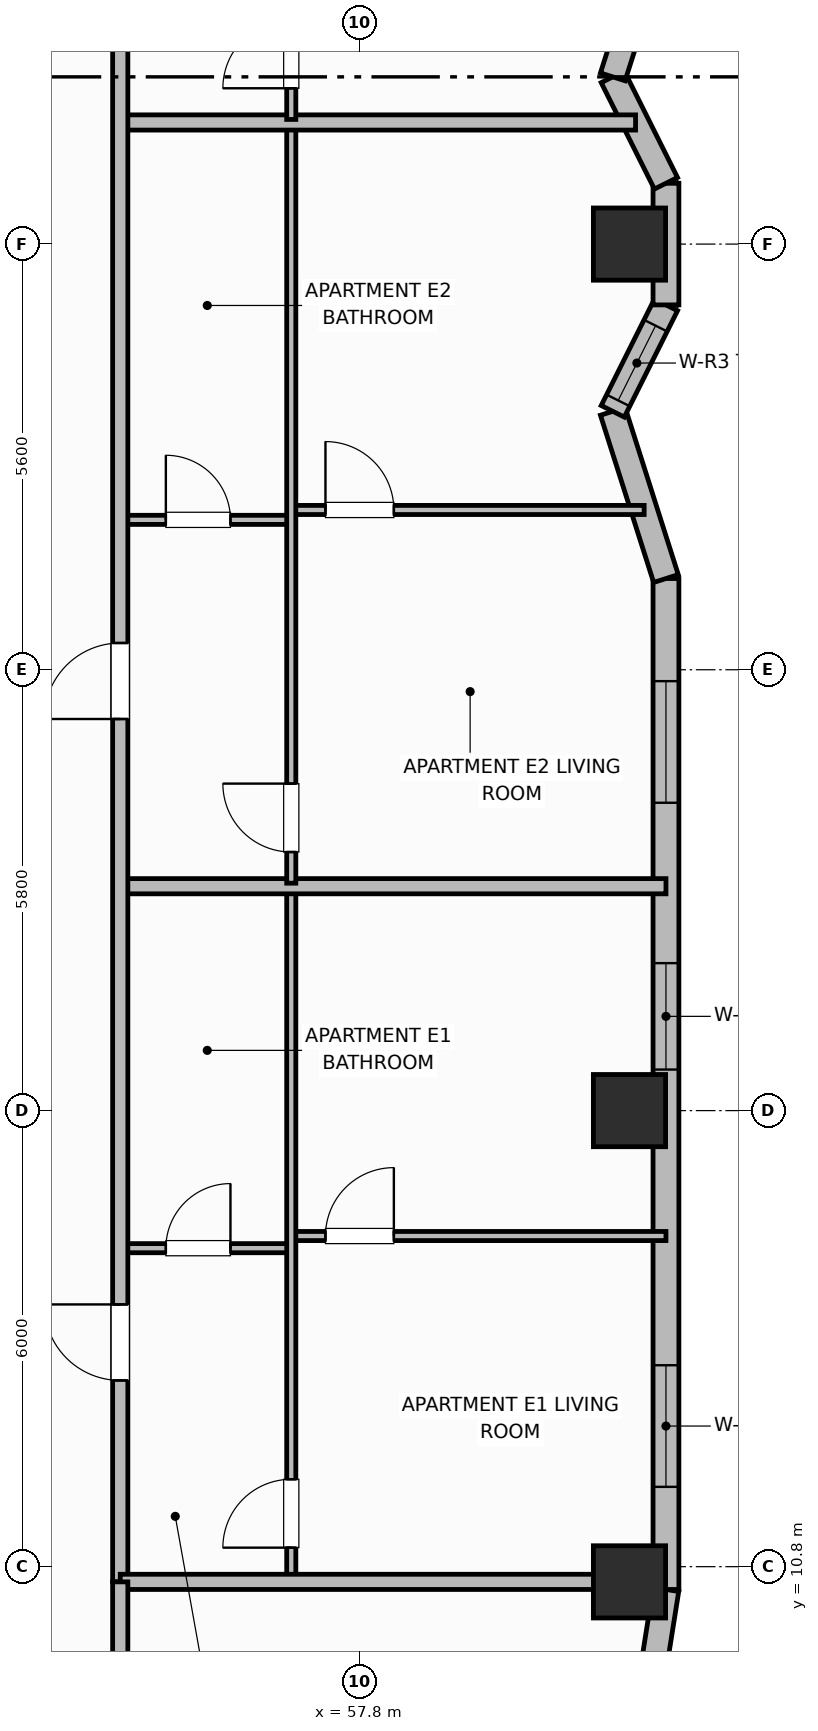
"""IFC4 building model, lengths in metres.
Left out: names, types, materials, properties, quantities, classifications, styles, units other than length and angle.
Written with IfcOpenShell. Run it as: python <this file> out.ifc"""

import sys

from ifc_helpers import new_model, si_unit, direction, frame, frame_2d, origin, origin_2d, place, context, subcontext, project, spatial, rectangle, extrude, element, fill, save


model = new_model("IFC4")
c1 = context("Model", 3, precision=1e-05, world=origin(), true_north=direction((0.0, 1.0)))
c2 = subcontext(c1, "Body", "Model", "MODEL_VIEW")
j1 = project(units=[si_unit("LENGTHUNIT", "METRE"), si_unit("PLANEANGLEUNIT", "RADIAN")], contexts=[c1])
p1 = place(None, origin())
s1 = spatial("IfcSite", under=j1, at=p1, CompositionType="ELEMENT")
p2 = place(p1, origin())
s2 = spatial("IfcBuilding", under=s1, at=p2, CompositionType="ELEMENT")
p3 = place(p2, frame((0.0, 0.0, 181.1)))
s3 = spatial("IfcBuildingStorey", under=s2, at=p3, CompositionType="ELEMENT", Elevation=181.1)
for number, where, z_axis, x_axis in (
    (1, (61.35, 10.6, 0.0), (0.0, 0.0, 1.0), (1.0, 0.0, 0.0)),
    (2, (61.35, 16.8, 0.0), (0.0, 0.0, 1.0), (1.0, 0.0, 0.0)),
    (3, (61.35, 28.2, 0.0), (0.0, 0.0, 1.0), (1.0, 0.0, 0.0)),
):
    element("IfcColumn", number, at=place(p3, frame(where, z_axis=z_axis, x_axis=x_axis)), inside=s3, PredefinedType="COLUMN", context=c2, shape_type="SweptSolid", body=[
        extrude(rectangle(XDim=0.95, YDim=0.95, at=origin_2d()), origin(), (0.0, 0.0, 1.0), 3.7),
    ])
p4 = place(p3, frame((61.652, 9.378, 0.0), z_axis=(0.0, 0.0, 1.0), x_axis=(0.156514556949, 0.987675651954, 0.0)))
e4 = element("IfcWall", 4, at=p4, inside=s3, PredefinedType="SOLIDWALL", context=c2, shape_type="SweptSolid", body=[
    extrude(rectangle(XDim=1.135, YDim=0.34, at=frame_2d((0.568, 0.0))), origin(), (0.0, 0.0, 1.0), 2.72),
])
p5 = place(p3, frame((61.83, 10.5, 0.0), z_axis=(0.0, 0.0, 1.0), x_axis=(0.0, 1.0, 0.0)))
e5 = element("IfcWall", 5, at=p5, inside=s3, PredefinedType="SOLIDWALL", context=c2, shape_type="SweptSolid", body=[
    extrude(rectangle(XDim=13.3, YDim=0.34, at=frame_2d((6.65, 0.0))), origin(), (0.0, 0.0, 1.0), 2.72),
])
p6 = place(p5, frame((1.35, 0.0, 0.7)))
e6 = element("IfcOpeningElement", 6, at=p6, cuts=e5, PredefinedType="OPENING", context=c2, shape_type="SweptSolid", body=[
    extrude(rectangle(XDim=1.6, YDim=1.9, at=frame_2d((0.8, 0.95))), frame((0.0, 0.18, 0.0), z_axis=(0.0, -1.0, 0.0), x_axis=(1.0, 0.0, 0.0)), (0.0, 0.0, 1.0), 0.36),
])
p7 = place(p5, frame((6.84, 0.0, 0.71)))
e7 = element("IfcOpeningElement", 7, at=p7, cuts=e5, PredefinedType="OPENING", context=c2, shape_type="SweptSolid", body=[
    extrude(rectangle(XDim=1.4, YDim=1.85, at=frame_2d((0.7, 0.925))), frame((0.0, 0.18, 0.0), z_axis=(0.0, -1.0, 0.0), x_axis=(1.0, 0.0, 0.0)), (0.0, 0.0, 1.0), 0.36),
])
p8 = place(p5, frame((10.35, 0.0, 0.7)))
e8 = element("IfcOpeningElement", 8, at=p8, cuts=e5, PredefinedType="OPENING", context=c2, shape_type="SweptSolid", body=[
    extrude(rectangle(XDim=1.6, YDim=1.9, at=frame_2d((0.8, 0.95))), frame((0.0, 0.18, 0.0), z_axis=(0.0, -1.0, 0.0), x_axis=(1.0, 0.0, 0.0)), (0.0, 0.0, 1.0), 0.36),
])
p9 = place(p3, frame((61.83, 23.8, 0.0), z_axis=(0.0, 0.0, 1.0), x_axis=(-0.303286588318, 0.95289938889, 0.0)))
e9 = element("IfcWall", 9, at=p9, inside=s3, PredefinedType="SOLIDWALL", context=c2, shape_type="SweptSolid", body=[
    extrude(rectangle(XDim=2.309, YDim=0.34, at=frame_2d((1.154, 0.0))), origin(), (0.0, 0.0, 1.0), 2.72),
])
p10 = place(p3, frame((61.13, 26.0, 0.0), z_axis=(0.0, 0.0, 1.0), x_axis=(0.447338371726, 0.894364792007, 0.0)))
e10 = element("IfcWall", 10, at=p10, inside=s3, PredefinedType="SOLIDWALL", context=c2, shape_type="SweptSolid", body=[
    extrude(rectangle(XDim=1.565, YDim=0.34, at=frame_2d((0.783, 0.0))), origin(), (0.0, 0.0, 1.0), 2.72),
])
p11 = place(p10, frame((0.16, 0.0, 0.91)))
e11 = element("IfcOpeningElement", 11, at=p11, cuts=e10, PredefinedType="OPENING", context=c2, shape_type="SweptSolid", body=[
    extrude(rectangle(XDim=1.1, YDim=1.65, at=frame_2d((0.55, 0.825))), frame((0.0, 0.18, 0.0), z_axis=(0.0, -1.0, 0.0), x_axis=(1.0, 0.0, 0.0)), (0.0, 0.0, 1.0), 0.36),
])
p12 = place(p3, frame((61.83, 27.4, 0.0), z_axis=(0.0, 0.0, 1.0), x_axis=(0.0, 1.0, 0.0)))
e12 = element("IfcWall", 12, at=p12, inside=s3, PredefinedType="SOLIDWALL", context=c2, shape_type="SweptSolid", body=[
    extrude(rectangle(XDim=1.6, YDim=0.34, at=frame_2d((0.8, 0.0))), origin(), (0.0, 0.0, 1.0), 2.72),
])
p13 = place(p3, frame((61.83, 29.0, 0.0), z_axis=(0.0, 0.0, 1.0), x_axis=(-0.447338371726, 0.894364792007, 0.0)))
e13 = element("IfcWall", 13, at=p13, inside=s3, PredefinedType="SOLIDWALL", context=c2, shape_type="SweptSolid", body=[
    extrude(rectangle(XDim=1.565, YDim=0.34, at=frame_2d((0.783, 0.0))), origin(), (0.0, 0.0, 1.0), 2.72),
])
p14 = place(p3, frame((61.13, 30.4, 0.0), z_axis=(0.0, 0.0, 1.0), x_axis=(0.303256029766, 0.952909114454, 0.0)))
e14 = element("IfcWall", 14, at=p14, inside=s3, PredefinedType="SOLIDWALL", context=c2, shape_type="SweptSolid", body=[
    extrude(rectangle(XDim=2.309, YDim=0.34, at=frame_2d((1.154, 0.0))), origin(), (0.0, 0.0, 1.0), 2.72),
])
p15 = place(p14, frame((0.604, 0.0, 0.91)))
e15 = element("IfcOpeningElement", 15, at=p15, cuts=e14, PredefinedType="OPENING", context=c2, shape_type="SweptSolid", body=[
    extrude(rectangle(XDim=1.1, YDim=1.65, at=frame_2d((0.55, 0.825))), frame((0.0, 0.18, 0.0), z_axis=(0.0, -1.0, 0.0), x_axis=(1.0, 0.0, 0.0)), (0.0, 0.0, 1.0), 0.36),
])
p16 = place(p3, frame((54.65, 14.99, 0.0), z_axis=(0.0, 0.0, 1.0), x_axis=(1.0, 0.0, 0.0)))
e16 = element("IfcWall", 16, at=p16, inside=s3, PredefinedType="PARTITIONING", context=c2, shape_type="SweptSolid", body=[
    extrude(rectangle(XDim=2.25, YDim=0.12, at=frame_2d((1.125, 0.0))), origin(), (0.0, 0.0, 1.0), 2.55),
])
p17 = place(p16, frame((0.6, 0.0, 0.0)))
e17 = element("IfcOpeningElement", 17, at=p17, cuts=e16, PredefinedType="OPENING", context=c2, shape_type="SweptSolid", body=[
    extrude(rectangle(XDim=0.85, YDim=2.1, at=frame_2d((0.425, 1.05))), frame((0.0, 0.07, 0.0), z_axis=(0.0, -1.0, 0.0), x_axis=(1.0, 0.0, 0.0)), (0.0, 0.0, 1.0), 0.14),
])
p18 = place(p3, frame((56.9, 15.15, 0.0), z_axis=(0.0, 0.0, 1.0), x_axis=(1.0, 0.0, 0.0)))
e18 = element("IfcWall", 18, at=p18, inside=s3, PredefinedType="PARTITIONING", context=c2, shape_type="SweptSolid", body=[
    extrude(rectangle(XDim=4.93, YDim=0.12, at=frame_2d((2.465, 0.0))), origin(), (0.0, 0.0, 1.0), 2.55),
])
p19 = place(p18, frame((0.45, 0.0, 0.0)))
e19 = element("IfcOpeningElement", 19, at=p19, cuts=e18, PredefinedType="OPENING", context=c2, shape_type="SweptSolid", body=[
    extrude(rectangle(XDim=0.9, YDim=2.1, at=frame_2d((0.45, 1.05))), frame((0.0, 0.07, 0.0), z_axis=(0.0, -1.0, 0.0), x_axis=(1.0, 0.0, 0.0)), (0.0, 0.0, 1.0), 0.14),
])
p20 = place(p3, frame((56.9, 10.64, 0.0), z_axis=(0.0, 0.0, 1.0), x_axis=(0.0, 1.0, 0.0)))
e20 = element("IfcWall", 20, at=p20, inside=s3, PredefinedType="PARTITIONING", context=c2, shape_type="SweptSolid", body=[
    extrude(rectangle(XDim=9.072, YDim=0.12, at=frame_2d((4.536, 0.0))), origin(), (0.0, 0.0, 1.0), 2.55),
])
p21 = place(p20, frame((0.41, 0.0, 0.0)))
e21 = element("IfcOpeningElement", 21, at=p21, cuts=e20, PredefinedType="OPENING", context=c2, shape_type="SweptSolid", body=[
    extrude(rectangle(XDim=0.9, YDim=2.1, at=frame_2d((0.45, 1.05))), frame((0.0, 0.07, 0.0), z_axis=(0.0, -1.0, 0.0), x_axis=(1.0, 0.0, 0.0)), (0.0, 0.0, 1.0), 0.14),
])
p22 = place(p3, frame((54.65, 19.752, 0.0), z_axis=(0.0, 0.0, 1.0), x_axis=(1.0, 0.0, 0.0)))
e22 = element("IfcWall", 22, at=p22, inside=s3, PredefinedType="PARTITIONING", context=c2, shape_type="SweptSolid", body=[
    extrude(rectangle(XDim=7.18, YDim=0.2, at=frame_2d((3.59, 0.0))), origin(), (0.0, 0.0, 1.0), 2.55),
])
p23 = place(p3, frame((54.65, 24.572, 0.0), z_axis=(0.0, 0.0, 1.0), x_axis=(1.0, 0.0, 0.0)))
e23 = element("IfcWall", 23, at=p23, inside=s3, PredefinedType="PARTITIONING", context=c2, shape_type="SweptSolid", body=[
    extrude(rectangle(XDim=2.25, YDim=0.12, at=frame_2d((1.125, 0.0))), origin(), (0.0, 0.0, 1.0), 2.55),
])
p24 = place(p23, frame((0.6, 0.0, 0.0)))
e24 = element("IfcOpeningElement", 24, at=p24, cuts=e23, PredefinedType="OPENING", context=c2, shape_type="SweptSolid", body=[
    extrude(rectangle(XDim=0.85, YDim=2.1, at=frame_2d((0.425, 1.05))), frame((0.0, 0.07, 0.0), z_axis=(0.0, -1.0, 0.0), x_axis=(1.0, 0.0, 0.0)), (0.0, 0.0, 1.0), 0.14),
])
p25 = place(p3, frame((56.9, 24.702, 0.0), z_axis=(0.0, 0.0, 1.0), x_axis=(1.0, 0.0, 0.0)))
e25 = element("IfcWall", 25, at=p25, inside=s3, PredefinedType="PARTITIONING", context=c2, shape_type="SweptSolid", body=[
    extrude(rectangle(XDim=4.643, YDim=0.12, at=frame_2d((2.322, 0.0))), origin(), (0.0, 0.0, 1.0), 2.55),
])
p26 = place(p25, frame((0.45, 0.0, 0.0)))
e26 = element("IfcOpeningElement", 26, at=p26, cuts=e25, PredefinedType="OPENING", context=c2, shape_type="SweptSolid", body=[
    extrude(rectangle(XDim=0.9, YDim=2.1, at=frame_2d((0.45, 1.05))), frame((0.0, 0.07, 0.0), z_axis=(0.0, -1.0, 0.0), x_axis=(1.0, 0.0, 0.0)), (0.0, 0.0, 1.0), 0.14),
])
p27 = place(p3, frame((56.9, 19.792, 0.0), z_axis=(0.0, 0.0, 1.0), x_axis=(0.0, 1.0, 0.0)))
e27 = element("IfcWall", 27, at=p27, inside=s3, PredefinedType="PARTITIONING", context=c2, shape_type="SweptSolid", body=[
    extrude(rectangle(XDim=9.968, YDim=0.12, at=frame_2d((4.984, 0.0))), origin(), (0.0, 0.0, 1.0), 2.55),
])
p28 = place(p27, frame((0.41, 0.0, 0.0)))
e28 = element("IfcOpeningElement", 28, at=p28, cuts=e27, PredefinedType="OPENING", context=c2, shape_type="SweptSolid", body=[
    extrude(rectangle(XDim=0.9, YDim=2.1, at=frame_2d((0.45, 1.05))), frame((0.0, 0.07, 0.0), z_axis=(0.0, -1.0, 0.0), x_axis=(1.0, 0.0, 0.0)), (0.0, 0.0, 1.0), 0.14),
])
p29 = place(p3, frame((54.65, 29.8, 0.0), z_axis=(0.0, 0.0, 1.0), x_axis=(1.0, 0.0, 0.0)))
e29 = element("IfcWall", 29, at=p29, inside=s3, PredefinedType="PARTITIONING", context=c2, shape_type="SweptSolid", body=[
    extrude(rectangle(XDim=6.78, YDim=0.2, at=frame_2d((3.39, 0.0))), origin(), (0.0, 0.0, 1.0), 2.55),
])
p30 = place(p3, frame((56.9, 29.84, 0.0), z_axis=(0.0, 0.0, 1.0), x_axis=(0.0, 1.0, 0.0)))
e30 = element("IfcWall", 30, at=p30, inside=s3, PredefinedType="PARTITIONING", context=c2, shape_type="SweptSolid", body=[
    extrude(rectangle(XDim=7.472, YDim=0.12, at=frame_2d((3.736, 0.0))), origin(), (0.0, 0.0, 1.0), 2.55),
])
p31 = place(p30, frame((0.41, 0.0, 0.0)))
e31 = element("IfcOpeningElement", 31, at=p31, cuts=e30, PredefinedType="OPENING", context=c2, shape_type="SweptSolid", body=[
    extrude(rectangle(XDim=0.9, YDim=2.1, at=frame_2d((0.45, 1.05))), frame((0.0, 0.07, 0.0), z_axis=(0.0, -1.0, 0.0), x_axis=(1.0, 0.0, 0.0)), (0.0, 0.0, 1.0), 0.14),
])
p32 = place(p3, frame((54.65, 10.6, 0.0), z_axis=(0.0, 0.0, 1.0), x_axis=(0.0, 1.0, 0.0)))
e32 = element("IfcWall", 32, at=p32, inside=s3, PredefinedType="PARTITIONING", context=c2, shape_type="SweptSolid", body=[
    extrude(rectangle(XDim=35.2, YDim=0.2, at=frame_2d((17.6, 0.0))), origin(), (0.0, 0.0, 1.0), 2.55),
])
p33 = place(p32, frame((2.65, 0.0, 0.0)))
e33 = element("IfcOpeningElement", 33, at=p33, cuts=e32, PredefinedType="OPENING", context=c2, shape_type="SweptSolid", body=[
    extrude(rectangle(XDim=1.0, YDim=2.15, at=frame_2d((0.5, 1.075))), frame((0.0, 0.11, 0.0), z_axis=(0.0, -1.0, 0.0), x_axis=(1.0, 0.0, 0.0)), (0.0, 0.0, 1.0), 0.22),
])
p34 = place(p32, frame((11.352, 0.0, 0.0)))
e34 = element("IfcOpeningElement", 34, at=p34, cuts=e32, PredefinedType="OPENING", context=c2, shape_type="SweptSolid", body=[
    extrude(rectangle(XDim=1.0, YDim=2.15, at=frame_2d((0.5, 1.075))), frame((0.0, 0.11, 0.0), z_axis=(0.0, -1.0, 0.0), x_axis=(1.0, 0.0, 0.0)), (0.0, 0.0, 1.0), 0.22),
])
p35 = place(p32, frame((21.37, 0.0, 0.0)))
e35 = element("IfcOpeningElement", 35, at=p35, cuts=e32, PredefinedType="OPENING", context=c2, shape_type="SweptSolid", body=[
    extrude(rectangle(XDim=1.0, YDim=2.15, at=frame_2d((0.5, 1.075))), frame((0.0, 0.11, 0.0), z_axis=(0.0, -1.0, 0.0), x_axis=(1.0, 0.0, 0.0)), (0.0, 0.0, 1.0), 0.22),
])
p36 = place(p32, frame((27.302, 0.0, 0.0)))
e36 = element("IfcOpeningElement", 36, at=p36, cuts=e32, PredefinedType="OPENING", context=c2, shape_type="SweptSolid", body=[
    extrude(rectangle(XDim=1.0, YDim=2.15, at=frame_2d((0.5, 1.075))), frame((0.0, 0.11, 0.0), z_axis=(0.0, -1.0, 0.0), x_axis=(1.0, 0.0, 0.0)), (0.0, 0.0, 1.0), 0.22),
])
p37 = place(p3, frame((54.65, 10.6, 0.0), z_axis=(0.0, 0.0, 1.0), x_axis=(1.0, 0.0, 0.0)))
e37 = element("IfcWall", 37, at=p37, inside=s3, PredefinedType="PARTITIONING", context=c2, shape_type="SweptSolid", body=[
    extrude(rectangle(XDim=6.76, YDim=0.2, at=frame_2d((3.38, 0.0))), origin(), (0.0, 0.0, 1.0), 2.55),
])
p38 = place(p3, frame((54.65, 6.87, 0.0), z_axis=(0.0, 0.0, 1.0), x_axis=(0.0, 1.0, 0.0)))
e38 = element("IfcWall", 38, at=p38, inside=s3, PredefinedType="PARTITIONING", context=c2, shape_type="SweptSolid", body=[
    extrude(rectangle(XDim=3.73, YDim=0.2, at=frame_2d((1.865, 0.0))), origin(), (0.0, 0.0, 1.0), 2.55),
])
p39 = place(p6, origin())
e39 = element("IfcWindow", 39, at=p39, inside=s3, PartitioningType="SINGLE_PANEL", PredefinedType="WINDOW", context=c2, shape_type="SweptSolid", body=[
    extrude(rectangle(XDim=1.6, YDim=1.9, at=frame_2d((0.8, 0.95))), frame((0.0, 0.03, 0.0), z_axis=(0.0, -1.0, 0.0), x_axis=(1.0, 0.0, 0.0)), (0.0, 0.0, 1.0), 0.06),
])
fill(e6, e39)
p40 = place(p7, origin())
e40 = element("IfcWindow", 40, at=p40, inside=s3, PartitioningType="SINGLE_PANEL", PredefinedType="WINDOW", context=c2, shape_type="SweptSolid", body=[
    extrude(rectangle(XDim=1.4, YDim=1.85, at=frame_2d((0.7, 0.925))), frame((0.0, 0.03, 0.0), z_axis=(0.0, -1.0, 0.0), x_axis=(1.0, 0.0, 0.0)), (0.0, 0.0, 1.0), 0.06),
])
fill(e7, e40)
p41 = place(p8, origin())
e41 = element("IfcWindow", 41, at=p41, inside=s3, PartitioningType="SINGLE_PANEL", PredefinedType="WINDOW", context=c2, shape_type="SweptSolid", body=[
    extrude(rectangle(XDim=1.6, YDim=1.9, at=frame_2d((0.8, 0.95))), frame((0.0, 0.03, 0.0), z_axis=(0.0, -1.0, 0.0), x_axis=(1.0, 0.0, 0.0)), (0.0, 0.0, 1.0), 0.06),
])
fill(e8, e41)
p42 = place(p11, origin())
e42 = element("IfcWindow", 42, at=p42, inside=s3, PartitioningType="SINGLE_PANEL", PredefinedType="WINDOW", context=c2, shape_type="SweptSolid", body=[
    extrude(rectangle(XDim=1.1, YDim=1.65, at=frame_2d((0.55, 0.825))), frame((0.0, 0.03, 0.0), z_axis=(0.0, -1.0, 0.0), x_axis=(1.0, 0.0, 0.0)), (0.0, 0.0, 1.0), 0.06),
])
fill(e11, e42)
p43 = place(p17, origin())
e43 = element("IfcDoor", 43, at=p43, inside=s3, OperationType="SINGLE_SWING_RIGHT", PredefinedType="DOOR", context=c2, shape_type="SweptSolid", body=[
    extrude(rectangle(XDim=0.85, YDim=2.1, at=frame_2d((0.425, 1.05))), frame((0.0, 0.025, 0.0), z_axis=(0.0, -1.0, 0.0), x_axis=(1.0, 0.0, 0.0)), (0.0, 0.0, 1.0), 0.05),
])
fill(e17, e43)
p44 = place(p19, origin())
e44 = element("IfcDoor", 44, at=p44, inside=s3, OperationType="SINGLE_SWING_RIGHT", PredefinedType="DOOR", context=c2, shape_type="SweptSolid", body=[
    extrude(rectangle(XDim=0.9, YDim=2.1, at=frame_2d((0.45, 1.05))), frame((0.0, 0.025, 0.0), z_axis=(0.0, -1.0, 0.0), x_axis=(1.0, 0.0, 0.0)), (0.0, 0.0, 1.0), 0.05),
])
fill(e19, e44)
p45 = place(p21, origin())
e45 = element("IfcDoor", 45, at=p45, inside=s3, OperationType="SINGLE_SWING_LEFT", PredefinedType="DOOR", context=c2, shape_type="SweptSolid", body=[
    extrude(rectangle(XDim=0.9, YDim=2.1, at=frame_2d((0.45, 1.05))), frame((0.0, 0.025, 0.0), z_axis=(0.0, -1.0, 0.0), x_axis=(1.0, 0.0, 0.0)), (0.0, 0.0, 1.0), 0.05),
])
fill(e21, e45)
p46 = place(p24, origin())
e46 = element("IfcDoor", 46, at=p46, inside=s3, OperationType="SINGLE_SWING_LEFT", PredefinedType="DOOR", context=c2, shape_type="SweptSolid", body=[
    extrude(rectangle(XDim=0.85, YDim=2.1, at=frame_2d((0.425, 1.05))), frame((0.0, 0.025, 0.0), z_axis=(0.0, -1.0, 0.0), x_axis=(1.0, 0.0, 0.0)), (0.0, 0.0, 1.0), 0.05),
])
fill(e24, e46)
p47 = place(p26, origin())
e47 = element("IfcDoor", 47, at=p47, inside=s3, OperationType="SINGLE_SWING_LEFT", PredefinedType="DOOR", context=c2, shape_type="SweptSolid", body=[
    extrude(rectangle(XDim=0.9, YDim=2.1, at=frame_2d((0.45, 1.05))), frame((0.0, 0.025, 0.0), z_axis=(0.0, -1.0, 0.0), x_axis=(1.0, 0.0, 0.0)), (0.0, 0.0, 1.0), 0.05),
])
fill(e26, e47)
p48 = place(p28, origin())
e48 = element("IfcDoor", 48, at=p48, inside=s3, OperationType="SINGLE_SWING_RIGHT", PredefinedType="DOOR", context=c2, shape_type="SweptSolid", body=[
    extrude(rectangle(XDim=0.9, YDim=2.1, at=frame_2d((0.45, 1.05))), frame((0.0, 0.025, 0.0), z_axis=(0.0, -1.0, 0.0), x_axis=(1.0, 0.0, 0.0)), (0.0, 0.0, 1.0), 0.05),
])
fill(e28, e48)
p49 = place(p31, origin())
e49 = element("IfcDoor", 49, at=p49, inside=s3, OperationType="SINGLE_SWING_LEFT", PredefinedType="DOOR", context=c2, shape_type="SweptSolid", body=[
    extrude(rectangle(XDim=0.9, YDim=2.1, at=frame_2d((0.45, 1.05))), frame((0.0, 0.025, 0.0), z_axis=(0.0, -1.0, 0.0), x_axis=(1.0, 0.0, 0.0)), (0.0, 0.0, 1.0), 0.05),
])
fill(e31, e49)
p50 = place(p33, origin())
e50 = element("IfcDoor", 50, at=p50, inside=s3, OperationType="SINGLE_SWING_RIGHT", PredefinedType="DOOR", context=c2, shape_type="SweptSolid", body=[
    extrude(rectangle(XDim=1.0, YDim=2.15, at=frame_2d((0.5, 1.075))), frame((0.0, 0.025, 0.0), z_axis=(0.0, -1.0, 0.0), x_axis=(1.0, 0.0, 0.0)), (0.0, 0.0, 1.0), 0.05),
])
fill(e33, e50)
p51 = place(p34, origin())
e51 = element("IfcDoor", 51, at=p51, inside=s3, OperationType="SINGLE_SWING_LEFT", PredefinedType="DOOR", context=c2, shape_type="SweptSolid", body=[
    extrude(rectangle(XDim=1.0, YDim=2.15, at=frame_2d((0.5, 1.075))), frame((0.0, 0.025, 0.0), z_axis=(0.0, -1.0, 0.0), x_axis=(1.0, 0.0, 0.0)), (0.0, 0.0, 1.0), 0.05),
])
fill(e34, e51)
save(model, sys.argv[1])
